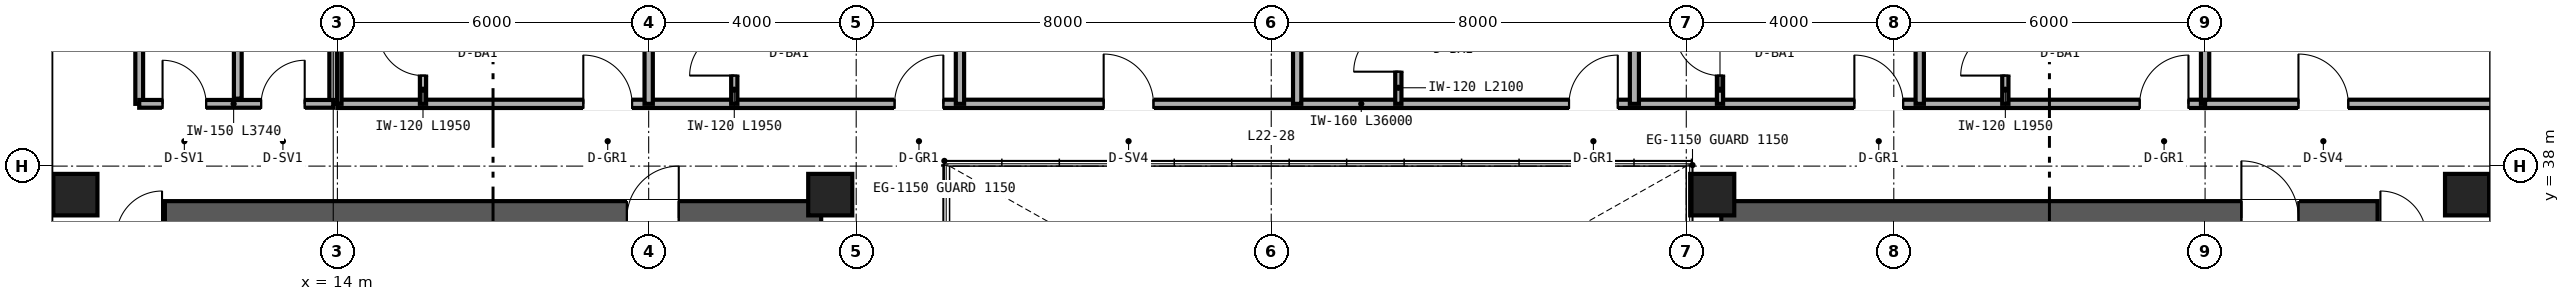
"""IFC4 building model, lengths in metres.
Left out: names, types, materials, properties, quantities, classifications, styles, units other than length and angle.
Written with IfcOpenShell. Run it as: python <this file> out.ifc"""

import sys

from ifc_helpers import new_model, si_unit, direction, frame, frame_2d, origin, origin_2d, place, context, subcontext, project, spatial, rectangle, hollow_rectangle, extrude, source, transform, mapped, element, fill, save


model = new_model("IFC4")
c1 = context("Model", 3, precision=1e-05, world=origin(), true_north=direction((0.0, 1.0)))
c2 = subcontext(c1, "Body", "Model", "MODEL_VIEW")
j1 = project(units=[si_unit("LENGTHUNIT", "METRE"), si_unit("PLANEANGLEUNIT", "RADIAN")], contexts=[c1])
p1 = place(None, origin())
s1 = spatial("IfcSite", under=j1, at=p1, CompositionType="ELEMENT")
p2 = place(p1, origin())
s2 = spatial("IfcBuilding", under=s1, at=p2, CompositionType="ELEMENT")
p3 = place(p2, frame((0.0, 0.0, 92.4)))
s3 = spatial("IfcBuildingStorey", under=s2, at=p3, CompositionType="ELEMENT", Elevation=92.4)
p4 = place(p3, frame((10.675, 37.0, 0.0), z_axis=(0.0, 0.0, 1.0), x_axis=(1.0, 0.0, 0.0)))
e1 = element("IfcWall", 1, at=p4, inside=s3, PredefinedType="SHEAR", context=c2, shape_type="SweptSolid", body=[
    extrude(rectangle(XDim=12.65, YDim=0.65, at=frame_2d((6.325, 0.0))), origin(), (0.0, 0.0, 1.0), 4.56),
])
p5 = place(p4, frame((8.905, 0.0, 0.0)))
e2 = element("IfcOpeningElement", 2, at=p5, cuts=e1, PredefinedType="OPENING", context=c2, shape_type="SweptSolid", body=[
    extrude(rectangle(XDim=1.0, YDim=2.15, at=frame_2d((0.5, 1.075))), frame((0.0, 0.335, 0.0), z_axis=(0.0, -1.0, 0.0), x_axis=(1.0, 0.0, 0.0)), (0.0, 0.0, 1.0), 0.67),
])
p6 = place(p3, frame((40.675, 37.0, 0.0), z_axis=(0.0, 0.0, 1.0), x_axis=(1.0, 0.0, 0.0)))
e3 = element("IfcWall", 3, at=p6, inside=s3, PredefinedType="SHEAR", context=c2, shape_type="SweptSolid", body=[
    extrude(rectangle(XDim=12.65, YDim=0.65, at=frame_2d((6.325, 0.0))), origin(), (0.0, 0.0, 1.0), 4.56),
])
p7 = place(p6, frame((10.025, 0.0, 0.0)))
e4 = element("IfcOpeningElement", 4, at=p7, cuts=e3, PredefinedType="OPENING", context=c2, shape_type="SweptSolid", body=[
    extrude(rectangle(XDim=1.1, YDim=2.15, at=frame_2d((0.55, 1.075))), frame((0.0, 0.335, 0.0), z_axis=(0.0, -1.0, 0.0), x_axis=(1.0, 0.0, 0.0)), (0.0, 0.0, 1.0), 0.67),
])
m1 = source(origin(), c2, "Body", "SweptSolid", [
    extrude(hollow_rectangle(XDim=0.85, YDim=0.8, WallThickness=0.032, at=origin_2d()), origin(), (0.0, 0.0, 1.0), 4.56),
])
for number, where, z_axis, x_axis in (
    (5, (8.95, 37.45, 0.0), (0.0, 0.0, 1.0), (1.0, 0.0, 0.0)),
    (6, (23.5, 37.45, 0.0), (0.0, 0.0, 1.0), (1.0, 0.0, 0.0)),
    (7, (40.5, 37.45, 0.0), (0.0, 0.0, 1.0), (1.0, 0.0, 0.0)),
    (8, (55.05, 37.45, 0.0), (0.0, 0.0, 1.0), (1.0, 0.0, 0.0)),
):
    element("IfcColumn", number, at=place(p3, frame(where, z_axis=z_axis, x_axis=x_axis)), inside=s3, PredefinedType="COLUMN", context=c2, shape_type="MappedRepresentation", body=[
        mapped(m1, transform((0.0, 0.0, 0.0), scale=1.0)),
    ])
p8 = place(p3, frame((14.0, 39.2, 0.0), z_axis=(0.0, 0.0, 1.0), x_axis=(1.0, 0.0, 0.0)))
e9 = element("IfcWall", 9, at=p8, inside=s3, PredefinedType="PARTITIONING", context=c2, shape_type="SweptSolid", body=[
    extrude(rectangle(XDim=36.0, YDim=0.16, at=frame_2d((18.0, 0.0))), origin(), (0.0, 0.0, 1.0), 3.781),
])
p9 = place(p8, frame((4.74, 0.0, 0.0)))
e10 = element("IfcOpeningElement", 10, at=p9, cuts=e9, PredefinedType="OPENING", context=c2, shape_type="SweptSolid", body=[
    extrude(rectangle(XDim=0.94, YDim=2.15, at=frame_2d((0.47, 1.075))), frame((0.0, 0.09, 0.0), z_axis=(0.0, -1.0, 0.0), x_axis=(1.0, 0.0, 0.0)), (0.0, 0.0, 1.0), 0.18),
])
p10 = place(p8, frame((10.74, 0.0, 0.0)))
e11 = element("IfcOpeningElement", 11, at=p10, cuts=e9, PredefinedType="OPENING", context=c2, shape_type="SweptSolid", body=[
    extrude(rectangle(XDim=0.94, YDim=2.15, at=frame_2d((0.47, 1.075))), frame((0.0, 0.09, 0.0), z_axis=(0.0, -1.0, 0.0), x_axis=(1.0, 0.0, 0.0)), (0.0, 0.0, 1.0), 0.18),
])
p11 = place(p8, frame((14.77, 0.0, 0.0)))
e12 = element("IfcOpeningElement", 12, at=p11, cuts=e9, PredefinedType="OPENING", context=c2, shape_type="SweptSolid", body=[
    extrude(rectangle(XDim=0.96, YDim=2.15, at=frame_2d((0.48, 1.075))), frame((0.0, 0.09, 0.0), z_axis=(0.0, -1.0, 0.0), x_axis=(1.0, 0.0, 0.0)), (0.0, 0.0, 1.0), 0.18),
])
p12 = place(p8, frame((23.74, 0.0, 0.0)))
e13 = element("IfcOpeningElement", 13, at=p12, cuts=e9, PredefinedType="OPENING", context=c2, shape_type="SweptSolid", body=[
    extrude(rectangle(XDim=0.94, YDim=2.15, at=frame_2d((0.47, 1.075))), frame((0.0, 0.09, 0.0), z_axis=(0.0, -1.0, 0.0), x_axis=(1.0, 0.0, 0.0)), (0.0, 0.0, 1.0), 0.18),
])
p13 = place(p8, frame((29.24, 0.0, 0.0)))
e14 = element("IfcOpeningElement", 14, at=p13, cuts=e9, PredefinedType="OPENING", context=c2, shape_type="SweptSolid", body=[
    extrude(rectangle(XDim=0.94, YDim=2.15, at=frame_2d((0.47, 1.075))), frame((0.0, 0.09, 0.0), z_axis=(0.0, -1.0, 0.0), x_axis=(1.0, 0.0, 0.0)), (0.0, 0.0, 1.0), 0.18),
])
p14 = place(p8, frame((34.74, 0.0, 0.0)))
e15 = element("IfcOpeningElement", 15, at=p14, cuts=e9, PredefinedType="OPENING", context=c2, shape_type="SweptSolid", body=[
    extrude(rectangle(XDim=0.94, YDim=2.15, at=frame_2d((0.47, 1.075))), frame((0.0, 0.09, 0.0), z_axis=(0.0, -1.0, 0.0), x_axis=(1.0, 0.0, 0.0)), (0.0, 0.0, 1.0), 0.18),
])
for number, where, z_axis, x_axis in (
    (16, (14.0, 39.2, 0.0), (0.0, 0.0, 1.0), (0.0, 1.0, 0.0)),
    (17, (50.0, 39.2, 0.0), (0.0, 0.0, 1.0), (0.0, 1.0, 0.0)),
    (18, (20.0, 39.2, 0.0), (0.0, 0.0, 1.0), (0.0, 1.0, 0.0)),
):
    element("IfcWall", number, at=place(p3, frame(where, z_axis=z_axis, x_axis=x_axis)), inside=s3, PredefinedType="PARTITIONING", context=c2, shape_type="SweptSolid", body=[
        extrude(rectangle(XDim=10.44, YDim=0.16, at=frame_2d((5.22, 0.0))), origin(), (0.0, 0.0, 1.0), 3.867),
    ])
p15 = place(p3, frame((15.65, 39.2, 0.0), z_axis=(0.0, 0.0, 1.0), x_axis=(0.0, 1.0, 0.0)))
e19 = element("IfcWall", 19, at=p15, inside=s3, PredefinedType="PARTITIONING", context=c2, shape_type="SweptSolid", body=[
    extrude(rectangle(XDim=1.95, YDim=0.12, at=frame_2d((0.975, 0.0))), origin(), (0.0, 0.0, 1.0), 4.56),
])
p16 = place(p15, frame((0.545, 0.0, 0.0)))
e20 = element("IfcOpeningElement", 20, at=p16, cuts=e19, PredefinedType="OPENING", context=c2, shape_type="SweptSolid", body=[
    extrude(rectangle(XDim=0.86, YDim=2.1, at=frame_2d((0.43, 1.05))), frame((0.0, 0.07, 0.0), z_axis=(0.0, -1.0, 0.0), x_axis=(1.0, 0.0, 0.0)), (0.0, 0.0, 1.0), 0.14),
])
p17 = place(p3, frame((26.0, 39.2, 0.0), z_axis=(0.0, 0.0, 1.0), x_axis=(0.0, 1.0, 0.0)))
e21 = element("IfcWall", 21, at=p17, inside=s3, PredefinedType="PARTITIONING", context=c2, shape_type="SweptSolid", body=[
    extrude(rectangle(XDim=10.44, YDim=0.16, at=frame_2d((5.22, 0.0))), origin(), (0.0, 0.0, 1.0), 3.633),
])
p18 = place(p3, frame((21.65, 39.2, 0.0), z_axis=(0.0, 0.0, 1.0), x_axis=(0.0, 1.0, 0.0)))
e22 = element("IfcWall", 22, at=p18, inside=s3, PredefinedType="PARTITIONING", context=c2, shape_type="SweptSolid", body=[
    extrude(rectangle(XDim=1.95, YDim=0.12, at=frame_2d((0.975, 0.0))), origin(), (0.0, 0.0, 1.0), 4.56),
])
p19 = place(p18, frame((0.545, 0.0, 0.0)))
e23 = element("IfcOpeningElement", 23, at=p19, cuts=e22, PredefinedType="OPENING", context=c2, shape_type="SweptSolid", body=[
    extrude(rectangle(XDim=0.86, YDim=2.1, at=frame_2d((0.43, 1.05))), frame((0.0, 0.07, 0.0), z_axis=(0.0, -1.0, 0.0), x_axis=(1.0, 0.0, 0.0)), (0.0, 0.0, 1.0), 0.14),
])
p20 = place(p3, frame((32.5, 39.2, 0.0), z_axis=(0.0, 0.0, 1.0), x_axis=(0.0, 1.0, 0.0)))
e24 = element("IfcWall", 24, at=p20, inside=s3, PredefinedType="PARTITIONING", context=c2, shape_type="SweptSolid", body=[
    extrude(rectangle(XDim=10.44, YDim=0.16, at=frame_2d((5.22, 0.0))), origin(), (0.0, 0.0, 1.0), 3.633),
])
p21 = place(p3, frame((39.0, 39.2, 0.0), z_axis=(0.0, 0.0, 1.0), x_axis=(0.0, 1.0, 0.0)))
e25 = element("IfcWall", 25, at=p21, inside=s3, PredefinedType="PARTITIONING", context=c2, shape_type="SweptSolid", body=[
    extrude(rectangle(XDim=10.44, YDim=0.175, at=frame_2d((5.22, 0.0))), origin(), (0.0, 0.0, 1.0), 3.633),
])
p22 = place(p3, frame((34.45, 39.2, 0.0), z_axis=(0.0, 0.0, 1.0), x_axis=(0.0, 1.0, 0.0)))
e26 = element("IfcWall", 26, at=p22, inside=s3, PredefinedType="PARTITIONING", context=c2, shape_type="SweptSolid", body=[
    extrude(rectangle(XDim=2.1, YDim=0.12, at=frame_2d((1.05, 0.0))), origin(), (0.0, 0.0, 1.0), 4.56),
])
p23 = place(p22, frame((0.62, 0.0, 0.0)))
e27 = element("IfcOpeningElement", 27, at=p23, cuts=e26, PredefinedType="OPENING", context=c2, shape_type="SweptSolid", body=[
    extrude(rectangle(XDim=0.86, YDim=2.1, at=frame_2d((0.43, 1.05))), frame((0.0, 0.07, 0.0), z_axis=(0.0, -1.0, 0.0), x_axis=(1.0, 0.0, 0.0)), (0.0, 0.0, 1.0), 0.14),
])
p24 = place(p3, frame((44.5, 39.2, 0.0), z_axis=(0.0, 0.0, 1.0), x_axis=(0.0, 1.0, 0.0)))
e28 = element("IfcWall", 28, at=p24, inside=s3, PredefinedType="PARTITIONING", context=c2, shape_type="SweptSolid", body=[
    extrude(rectangle(XDim=10.44, YDim=0.16, at=frame_2d((5.22, 0.0))), origin(), (0.0, 0.0, 1.0), 3.867),
])
p25 = place(p3, frame((40.65, 39.2, 0.0), z_axis=(0.0, 0.0, 1.0), x_axis=(0.0, 1.0, 0.0)))
e29 = element("IfcWall", 29, at=p25, inside=s3, PredefinedType="PARTITIONING", context=c2, shape_type="SweptSolid", body=[
    extrude(rectangle(XDim=1.95, YDim=0.12, at=frame_2d((0.975, 0.0))), origin(), (0.0, 0.0, 1.0), 3.781),
])
p26 = place(p25, frame((0.545, 0.0, 0.0)))
e30 = element("IfcOpeningElement", 30, at=p26, cuts=e29, PredefinedType="OPENING", context=c2, shape_type="SweptSolid", body=[
    extrude(rectangle(XDim=0.86, YDim=2.1, at=frame_2d((0.43, 1.05))), frame((0.0, 0.07, 0.0), z_axis=(0.0, -1.0, 0.0), x_axis=(1.0, 0.0, 0.0)), (0.0, 0.0, 1.0), 0.14),
])
p27 = place(p3, frame((46.15, 39.2, 0.0), z_axis=(0.0, 0.0, 1.0), x_axis=(0.0, 1.0, 0.0)))
e31 = element("IfcWall", 31, at=p27, inside=s3, PredefinedType="PARTITIONING", context=c2, shape_type="SweptSolid", body=[
    extrude(rectangle(XDim=1.95, YDim=0.12, at=frame_2d((0.975, 0.0))), origin(), (0.0, 0.0, 1.0), 4.56),
])
p28 = place(p27, frame((0.545, 0.0, 0.0)))
e32 = element("IfcOpeningElement", 32, at=p28, cuts=e31, PredefinedType="OPENING", context=c2, shape_type="SweptSolid", body=[
    extrude(rectangle(XDim=0.86, YDim=2.1, at=frame_2d((0.43, 1.05))), frame((0.0, 0.07, 0.0), z_axis=(0.0, -1.0, 0.0), x_axis=(1.0, 0.0, 0.0)), (0.0, 0.0, 1.0), 0.14),
])
p29 = place(p3, frame((50.0, 39.2, 0.0), z_axis=(0.0, 0.0, 1.0), x_axis=(1.0, 0.0, 0.0)))
e33 = element("IfcWall", 33, at=p29, inside=s3, PredefinedType="PARTITIONING", context=c2, shape_type="SweptSolid", body=[
    extrude(rectangle(XDim=5.62, YDim=0.16, at=frame_2d((2.81, 0.0))), origin(), (0.0, 0.0, 1.0), 4.56),
])
p30 = place(p29, frame((1.8, 0.0, 0.0)))
e34 = element("IfcOpeningElement", 34, at=p30, cuts=e33, PredefinedType="OPENING", context=c2, shape_type="SweptSolid", body=[
    extrude(rectangle(XDim=0.96, YDim=2.15, at=frame_2d((0.48, 1.075))), frame((0.0, 0.09, 0.0), z_axis=(0.0, -1.0, 0.0), x_axis=(1.0, 0.0, 0.0)), (0.0, 0.0, 1.0), 0.18),
])
p31 = place(p3, frame((12.08, 39.3, 0.0), z_axis=(0.0, 0.0, 1.0), x_axis=(0.0, 1.0, 0.0)))
e35 = element("IfcWall", 35, at=p31, inside=s3, PredefinedType="PARTITIONING", context=c2, shape_type="SweptSolid", body=[
    extrude(rectangle(XDim=2.55, YDim=0.15, at=frame_2d((1.275, 0.0))), origin(), (0.0, 0.0, 1.0), 4.56),
])
for number, where, z_axis, x_axis in (
    (36, (10.18, 39.2, 0.0), (0.0, 0.0, 1.0), (0.0, 1.0, 0.0)),
    (37, (13.92, 39.2, 0.0), (0.0, 0.0, 1.0), (0.0, 1.0, 0.0)),
):
    element("IfcWall", number, at=place(p3, frame(where, z_axis=z_axis, x_axis=x_axis)), inside=s3, PredefinedType="PARTITIONING", context=c2, shape_type="SweptSolid", body=[
        extrude(rectangle(XDim=2.65, YDim=0.15, at=frame_2d((1.325, 0.0))), origin(), (0.0, 0.0, 1.0), 4.56),
    ])
p32 = place(p3, frame((10.18, 39.2, 0.0), z_axis=(0.0, 0.0, 1.0), x_axis=(1.0, 0.0, 0.0)))
e38 = element("IfcWall", 38, at=p32, inside=s3, PredefinedType="PARTITIONING", context=c2, shape_type="SweptSolid", body=[
    extrude(rectangle(XDim=3.74, YDim=0.15, at=frame_2d((1.87, 0.0))), origin(), (0.0, 0.0, 1.0), 4.56),
])
p33 = place(p32, frame((0.45, 0.0, 0.0)))
e39 = element("IfcOpeningElement", 39, at=p33, cuts=e38, PredefinedType="OPENING", context=c2, shape_type="SweptSolid", body=[
    extrude(rectangle(XDim=0.84, YDim=2.1, at=frame_2d((0.42, 1.05))), frame((0.0, 0.085, 0.0), z_axis=(0.0, -1.0, 0.0), x_axis=(1.0, 0.0, 0.0)), (0.0, 0.0, 1.0), 0.17),
])
p34 = place(p32, frame((2.35, 0.0, 0.0)))
e40 = element("IfcOpeningElement", 40, at=p34, cuts=e38, PredefinedType="OPENING", context=c2, shape_type="SweptSolid", body=[
    extrude(rectangle(XDim=0.84, YDim=2.1, at=frame_2d((0.42, 1.05))), frame((0.0, 0.085, 0.0), z_axis=(0.0, -1.0, 0.0), x_axis=(1.0, 0.0, 0.0)), (0.0, 0.0, 1.0), 0.17),
])
m2 = source(origin(), c2, "Body", "SweptSolid", [
    extrude(rectangle(XDim=1.0, YDim=2.15, at=frame_2d((0.5, 1.075))), frame((0.0, 0.025, 0.0), z_axis=(0.0, -1.0, 0.0), x_axis=(1.0, 0.0, 0.0)), (0.0, 0.0, 1.0), 0.05),
])
p35 = place(p5, origin())
e41 = element("IfcDoor", 41, at=p35, inside=s3, OperationType="SINGLE_SWING_RIGHT", PredefinedType="DOOR", context=c2, shape_type="MappedRepresentation", body=[
    mapped(m2, transform((0.0, 0.0, 0.0), scale=1.0)),
])
fill(e2, e41)
m3 = source(origin(), c2, "Body", "SweptSolid", [
    extrude(rectangle(XDim=1.1, YDim=2.15, at=frame_2d((0.55, 1.075))), frame((0.0, 0.025, 0.0), z_axis=(0.0, -1.0, 0.0), x_axis=(1.0, 0.0, 0.0)), (0.0, 0.0, 1.0), 0.05),
])
p36 = place(p7, origin())
e42 = element("IfcDoor", 42, at=p36, inside=s3, OperationType="SINGLE_SWING_LEFT", PredefinedType="DOOR", context=c2, shape_type="MappedRepresentation", body=[
    mapped(m3, transform((0.0, 0.0, 0.0), scale=1.0)),
])
fill(e4, e42)
m4 = source(origin(), c2, "Body", "SweptSolid", [
    extrude(rectangle(XDim=0.86, YDim=2.1, at=frame_2d((0.43, 1.05))), frame((0.0, 0.025, 0.0), z_axis=(0.0, -1.0, 0.0), x_axis=(1.0, 0.0, 0.0)), (0.0, 0.0, 1.0), 0.05),
])
p37 = place(p16, origin())
e43 = element("IfcDoor", 43, at=p37, inside=s3, OperationType="SINGLE_SWING_RIGHT", PredefinedType="DOOR", context=c2, shape_type="MappedRepresentation", body=[
    mapped(m4, transform((0.0, 0.0, 0.0), scale=1.0)),
])
fill(e20, e43)
p38 = place(p19, origin())
e44 = element("IfcDoor", 44, at=p38, inside=s3, OperationType="SINGLE_SWING_LEFT", PredefinedType="DOOR", context=c2, shape_type="MappedRepresentation", body=[
    mapped(m4, transform((0.0, 0.0, 0.0), scale=1.0)),
])
fill(e23, e44)
p39 = place(p23, origin())
e45 = element("IfcDoor", 45, at=p39, inside=s3, OperationType="SINGLE_SWING_LEFT", PredefinedType="DOOR", context=c2, shape_type="MappedRepresentation", body=[
    mapped(m4, transform((0.0, 0.0, 0.0), scale=1.0)),
])
fill(e27, e45)
p40 = place(p26, origin())
e46 = element("IfcDoor", 46, at=p40, inside=s3, OperationType="SINGLE_SWING_RIGHT", PredefinedType="DOOR", context=c2, shape_type="MappedRepresentation", body=[
    mapped(m4, transform((0.0, 0.0, 0.0), scale=1.0)),
])
fill(e30, e46)
p41 = place(p28, origin())
e47 = element("IfcDoor", 47, at=p41, inside=s3, OperationType="SINGLE_SWING_LEFT", PredefinedType="DOOR", context=c2, shape_type="MappedRepresentation", body=[
    mapped(m4, transform((0.0, 0.0, 0.0), scale=1.0)),
])
fill(e32, e47)
m5 = source(origin(), c2, "Body", "SweptSolid", [
    extrude(rectangle(XDim=0.94, YDim=2.15, at=frame_2d((0.47, 1.075))), frame((0.0, 0.025, 0.0), z_axis=(0.0, -1.0, 0.0), x_axis=(1.0, 0.0, 0.0)), (0.0, 0.0, 1.0), 0.05),
])
p42 = place(p9, origin())
e48 = element("IfcDoor", 48, at=p42, inside=s3, OperationType="SINGLE_SWING_LEFT", PredefinedType="DOOR", context=c2, shape_type="MappedRepresentation", body=[
    mapped(m5, transform((0.0, 0.0, 0.0), scale=1.0)),
])
fill(e10, e48)
p43 = place(p10, origin())
e49 = element("IfcDoor", 49, at=p43, inside=s3, OperationType="SINGLE_SWING_RIGHT", PredefinedType="DOOR", context=c2, shape_type="MappedRepresentation", body=[
    mapped(m5, transform((0.0, 0.0, 0.0), scale=1.0)),
])
fill(e11, e49)
m6 = source(origin(), c2, "Body", "SweptSolid", [
    extrude(rectangle(XDim=0.96, YDim=2.15, at=frame_2d((0.48, 1.075))), frame((0.0, 0.025, 0.0), z_axis=(0.0, -1.0, 0.0), x_axis=(1.0, 0.0, 0.0)), (0.0, 0.0, 1.0), 0.05),
])
p44 = place(p11, origin())
e50 = element("IfcDoor", 50, at=p44, inside=s3, OperationType="SINGLE_SWING_LEFT", PredefinedType="DOOR", context=c2, shape_type="MappedRepresentation", body=[
    mapped(m6, transform((0.0, 0.0, 0.0), scale=1.0)),
])
fill(e12, e50)
p45 = place(p12, origin())
e51 = element("IfcDoor", 51, at=p45, inside=s3, OperationType="SINGLE_SWING_RIGHT", PredefinedType="DOOR", context=c2, shape_type="MappedRepresentation", body=[
    mapped(m5, transform((0.0, 0.0, 0.0), scale=1.0)),
])
fill(e13, e51)
p46 = place(p13, origin())
e52 = element("IfcDoor", 52, at=p46, inside=s3, OperationType="SINGLE_SWING_LEFT", PredefinedType="DOOR", context=c2, shape_type="MappedRepresentation", body=[
    mapped(m5, transform((0.0, 0.0, 0.0), scale=1.0)),
])
fill(e14, e52)
p47 = place(p14, origin())
e53 = element("IfcDoor", 53, at=p47, inside=s3, OperationType="SINGLE_SWING_RIGHT", PredefinedType="DOOR", context=c2, shape_type="MappedRepresentation", body=[
    mapped(m5, transform((0.0, 0.0, 0.0), scale=1.0)),
])
fill(e15, e53)
p48 = place(p30, origin())
e54 = element("IfcDoor", 54, at=p48, inside=s3, OperationType="SINGLE_SWING_LEFT", PredefinedType="DOOR", context=c2, shape_type="MappedRepresentation", body=[
    mapped(m6, transform((0.0, 0.0, 0.0), scale=1.0)),
])
fill(e34, e54)
m7 = source(origin(), c2, "Body", "SweptSolid", [
    extrude(rectangle(XDim=0.84, YDim=2.1, at=frame_2d((0.42, 1.05))), frame((0.0, 0.025, 0.0), z_axis=(0.0, -1.0, 0.0), x_axis=(1.0, 0.0, 0.0)), (0.0, 0.0, 1.0), 0.05),
])
p49 = place(p33, origin())
e55 = element("IfcDoor", 55, at=p49, inside=s3, OperationType="SINGLE_SWING_LEFT", PredefinedType="DOOR", context=c2, shape_type="MappedRepresentation", body=[
    mapped(m7, transform((0.0, 0.0, 0.0), scale=1.0)),
])
fill(e39, e55)
p50 = place(p34, origin())
e56 = element("IfcDoor", 56, at=p50, inside=s3, OperationType="SINGLE_SWING_RIGHT", PredefinedType="DOOR", context=c2, shape_type="MappedRepresentation", body=[
    mapped(m7, transform((0.0, 0.0, 0.0), scale=1.0)),
])
fill(e40, e56)
save(model, sys.argv[1])
